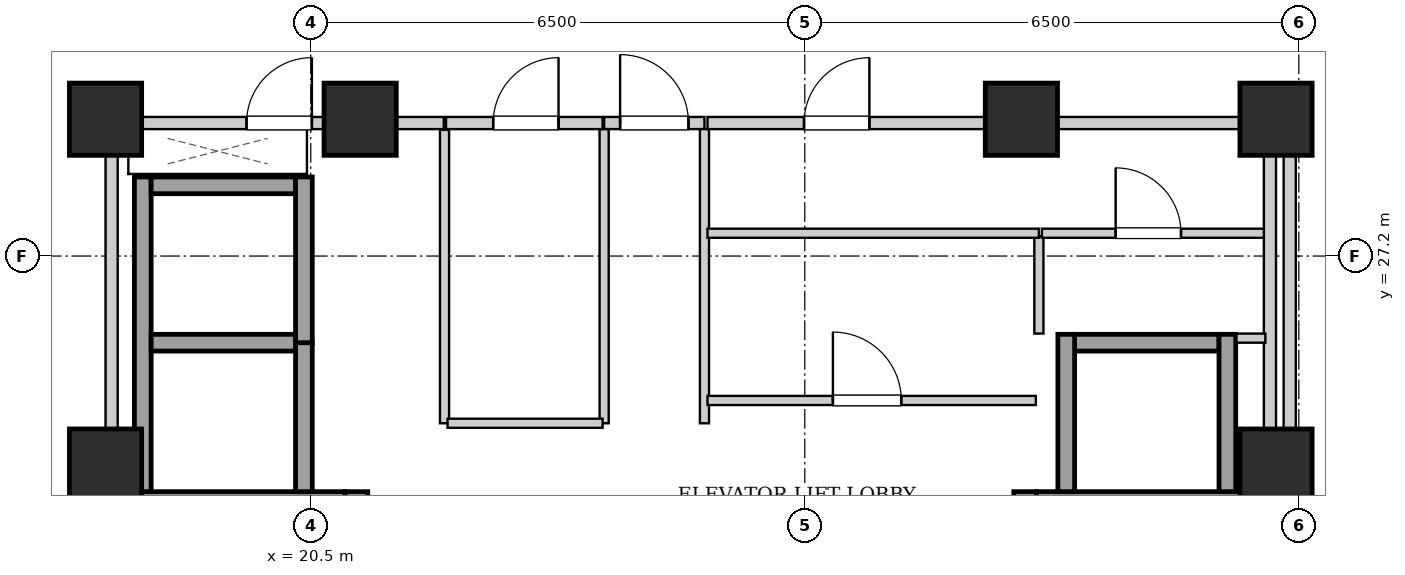
"""IFC4 building model, lengths in metres.
Left out: names, types, materials, properties, quantities, classifications, styles, units other than length and angle.
Written with IfcOpenShell. Run it as: python <this file> out.ifc"""

import sys

from ifc_helpers import new_model, si_unit, direction, frame, frame_2d, origin, origin_2d, place, context, subcontext, project, spatial, rectangle, extrude, element, fill, save


model = new_model("IFC4")
c1 = context("Model", 3, precision=1e-05, world=origin(), true_north=direction((0.0, 1.0)))
c2 = subcontext(c1, "Body", "Model", "MODEL_VIEW")
j1 = project(units=[si_unit("LENGTHUNIT", "METRE"), si_unit("PLANEANGLEUNIT", "RADIAN")], contexts=[c1])
p1 = place(None, origin())
s1 = spatial("IfcSite", under=j1, at=p1, CompositionType="ELEMENT")
p2 = place(p1, origin())
s2 = spatial("IfcBuilding", under=s1, at=p2, CompositionType="ELEMENT")
p3 = place(p2, frame((0.0, 0.0, 160.15)))
s3 = spatial("IfcBuildingStorey", under=s2, at=p3, CompositionType="ELEMENT", Elevation=160.15)
for number, where, z_axis, x_axis in (
    (1, (17.8, 29.0, 0.0), (0.0, 0.0, 1.0), (1.0, 0.0, 0.0)),
    (2, (21.15, 29.0, 0.0), (0.0, 0.0, 1.0), (1.0, 0.0, 0.0)),
    (3, (29.85, 29.0, 0.0), (0.0, 0.0, 1.0), (1.0, 0.0, 0.0)),
    (4, (33.2, 29.0, 0.0), (0.0, 0.0, 1.0), (1.0, 0.0, 0.0)),
    (5, (17.8, 24.45, 0.0), (0.0, 0.0, 1.0), (1.0, 0.0, 0.0)),
    (6, (33.2, 24.45, 0.0), (0.0, 0.0, 1.0), (1.0, 0.0, 0.0)),
):
    element("IfcColumn", number, at=place(p3, frame(where, z_axis=z_axis, x_axis=x_axis)), inside=s3, PredefinedType="COLUMN", context=c2, shape_type="SweptSolid", body=[
        extrude(rectangle(XDim=0.95, YDim=0.95, at=origin_2d()), origin(), (0.0, 0.0, 1.0), 3.25),
    ])
for number, where, z_axis, x_axis in (
    (7, (17.95, 15.1, 0.0), (0.0, 0.0, 1.0), (0.0, 1.0, 0.0)),
    (8, (21.1, 15.1, 0.0), (0.0, 0.0, 1.0), (0.0, 1.0, 0.0)),
):
    element("IfcWall", number, at=place(p3, frame(where, z_axis=z_axis, x_axis=x_axis)), inside=s3, PredefinedType="SHEAR", context=c2, shape_type="SweptSolid", body=[
        extrude(rectangle(XDim=9.0, YDim=0.3, at=frame_2d((4.5, 0.0))), origin(), (0.0, 0.0, 1.0), 2.99),
    ])
p4 = place(p3, frame((18.1, 23.95, 0.0), z_axis=(0.0, 0.0, 1.0), x_axis=(1.0, 0.0, 0.0)))
e9 = element("IfcWall", 9, at=p4, inside=s3, PredefinedType="SHEAR", context=c2, shape_type="SweptSolid", body=[
    extrude(rectangle(XDim=2.85, YDim=0.3, at=frame_2d((1.425, 0.0))), origin(), (0.0, 0.0, 1.0), 2.99),
])
for number, where, z_axis, x_axis in (
    (10, (29.9, 15.1, 0.0), (0.0, 0.0, 1.0), (0.0, 1.0, 0.0)),
    (11, (33.05, 15.1, 0.0), (0.0, 0.0, 1.0), (0.0, 1.0, 0.0)),
):
    element("IfcWall", number, at=place(p3, frame(where, z_axis=z_axis, x_axis=x_axis)), inside=s3, PredefinedType="SHEAR", context=c2, shape_type="SweptSolid", body=[
        extrude(rectangle(XDim=9.0, YDim=0.3, at=frame_2d((4.5, 0.0))), origin(), (0.0, 0.0, 1.0), 2.99),
    ])
p5 = place(p3, frame((30.05, 23.95, 0.0), z_axis=(0.0, 0.0, 1.0), x_axis=(1.0, 0.0, 0.0)))
e12 = element("IfcWall", 12, at=p5, inside=s3, PredefinedType="SHEAR", context=c2, shape_type="SweptSolid", body=[
    extrude(rectangle(XDim=2.85, YDim=0.3, at=frame_2d((1.425, 0.0))), origin(), (0.0, 0.0, 1.0), 2.99),
])
p6 = place(p3, frame((18.29, 24.1, 0.0), z_axis=(0.0, 0.0, 1.0), x_axis=(0.0, 1.0, 0.0)))
e13 = element("IfcWall", 13, at=p6, inside=s3, PredefinedType="SHEAR", context=c2, shape_type="SweptSolid", body=[
    extrude(rectangle(XDim=4.14, YDim=0.22, at=frame_2d((2.07, 0.0))), origin(), (0.0, 0.0, 1.0), 2.99),
])
p7 = place(p3, frame((20.41, 24.1, 0.0), z_axis=(0.0, 0.0, 1.0), x_axis=(0.0, 1.0, 0.0)))
e14 = element("IfcWall", 14, at=p7, inside=s3, PredefinedType="SHEAR", context=c2, shape_type="SweptSolid", body=[
    extrude(rectangle(XDim=1.96, YDim=0.22, at=frame_2d((0.98, 0.0))), origin(), (0.0, 0.0, 1.0), 2.99),
])
for number, where, z_axis, x_axis in (
    (15, (18.4, 26.06, 0.0), (0.0, 0.0, 1.0), (1.0, 0.0, 0.0)),
    (16, (18.4, 28.13, 0.0), (0.0, 0.0, 1.0), (1.0, 0.0, 0.0)),
):
    element("IfcWall", number, at=place(p3, frame(where, z_axis=z_axis, x_axis=x_axis)), inside=s3, PredefinedType="SHEAR", context=c2, shape_type="SweptSolid", body=[
        extrude(rectangle(XDim=1.9, YDim=0.22, at=frame_2d((0.95, 0.0))), origin(), (0.0, 0.0, 1.0), 2.99),
    ])
p8 = place(p3, frame((20.41, 26.06, 0.0), z_axis=(0.0, 0.0, 1.0), x_axis=(0.0, 1.0, 0.0)))
e17 = element("IfcWall", 17, at=p8, inside=s3, PredefinedType="SHEAR", context=c2, shape_type="SweptSolid", body=[
    extrude(rectangle(XDim=2.18, YDim=0.22, at=frame_2d((1.09, 0.0))), origin(), (0.0, 0.0, 1.0), 2.99),
])
p9 = place(p3, frame((30.55, 26.06, 0.0), z_axis=(0.0, 0.0, 1.0), x_axis=(1.0, 0.0, 0.0)))
e18 = element("IfcWall", 18, at=p9, inside=s3, PredefinedType="SHEAR", context=c2, shape_type="SweptSolid", body=[
    extrude(rectangle(XDim=1.9, YDim=0.22, at=frame_2d((0.95, 0.0))), origin(), (0.0, 0.0, 1.0), 2.99),
])
for number, where, z_axis, x_axis in (
    (19, (30.44, 24.1, 0.0), (0.0, 0.0, 1.0), (0.0, 1.0, 0.0)),
    (20, (32.56, 24.1, 0.0), (0.0, 0.0, 1.0), (0.0, 1.0, 0.0)),
):
    element("IfcWall", number, at=place(p3, frame(where, z_axis=z_axis, x_axis=x_axis)), inside=s3, PredefinedType="SHEAR", context=c2, shape_type="SweptSolid", body=[
        extrude(rectangle(XDim=2.07, YDim=0.22, at=frame_2d((1.035, 0.0))), origin(), (0.0, 0.0, 1.0), 2.99),
    ])
for number, where, z_axis, x_axis in (
    (21, (17.88, 24.12, 0.0), (0.0, 0.0, 1.0), (0.0, 1.0, 0.0)),
    (22, (33.12, 24.12, 0.0), (0.0, 0.0, 1.0), (0.0, 1.0, 0.0)),
):
    element("IfcWall", number, at=place(p3, frame(where, z_axis=z_axis, x_axis=x_axis)), inside=s3, PredefinedType="PARTITIONING", context=c2, shape_type="SweptSolid", body=[
        extrude(rectangle(XDim=4.76, YDim=0.16, at=frame_2d((2.38, 0.0))), origin(), (0.0, 0.0, 1.0), 2.99),
    ])
p10 = place(p3, frame((24.36, 28.95, 0.0), z_axis=(0.0, 0.0, 1.0), x_axis=(1.0, 0.0, 0.0)))
e23 = element("IfcWall", 23, at=p10, inside=s3, PredefinedType="PARTITIONING", context=c2, shape_type="SweptSolid", body=[
    extrude(rectangle(XDim=1.32, YDim=0.16, at=frame_2d((0.66, 0.0))), origin(), (0.0, 0.0, 1.0), 2.442),
])
p11 = place(p10, frame((0.21, 0.0, 0.0)))
e24 = element("IfcOpeningElement", 24, at=p11, cuts=e23, PredefinedType="OPENING", context=c2, shape_type="SweptSolid", body=[
    extrude(rectangle(XDim=0.9, YDim=2.05, at=frame_2d((0.45, 1.025))), frame((0.0, 0.09, 0.0), z_axis=(0.0, -1.0, 0.0), x_axis=(1.0, 0.0, 0.0)), (0.0, 0.0, 1.0), 0.18),
])
p12 = place(p3, frame((17.96, 28.95, 0.0), z_axis=(0.0, 0.0, 1.0), x_axis=(1.0, 0.0, 0.0)))
e25 = element("IfcWall", 25, at=p12, inside=s3, PredefinedType="PARTITIONING", context=c2, shape_type="SweptSolid", body=[
    extrude(rectangle(XDim=4.29, YDim=0.16, at=frame_2d((2.145, 0.0))), origin(), (0.0, 0.0, 1.0), 2.442),
])
p13 = place(p12, frame((1.695, 0.0, 0.0)))
e26 = element("IfcOpeningElement", 26, at=p13, cuts=e25, PredefinedType="OPENING", context=c2, shape_type="SweptSolid", body=[
    extrude(rectangle(XDim=0.86, YDim=2.05, at=frame_2d((0.43, 1.025))), frame((0.0, 0.09, 0.0), z_axis=(0.0, -1.0, 0.0), x_axis=(1.0, 0.0, 0.0)), (0.0, 0.0, 1.0), 0.18),
])
for number, where, z_axis, x_axis in (
    (27, (24.36, 25.0, 0.0), (0.0, 0.0, 1.0), (0.0, 1.0, 0.0)),
    (28, (25.68, 25.0, 0.0), (0.0, 0.0, 1.0), (0.0, 1.0, 0.0)),
):
    element("IfcWall", number, at=place(p3, frame(where, z_axis=z_axis, x_axis=x_axis)), inside=s3, PredefinedType="PARTITIONING", context=c2, shape_type="SweptSolid", body=[
        extrude(rectangle(XDim=3.87, YDim=0.12, at=frame_2d((1.935, 0.0))), origin(), (0.0, 0.0, 1.0), 2.99),
    ])
p14 = place(p3, frame((30.08, 26.18, 0.0), z_axis=(0.0, 0.0, 1.0), x_axis=(0.0, 1.0, 0.0)))
e29 = element("IfcWall", 29, at=p14, inside=s3, PredefinedType="PARTITIONING", context=c2, shape_type="SweptSolid", body=[
    extrude(rectangle(XDim=1.28, YDim=0.12, at=frame_2d((0.64, 0.0))), origin(), (0.0, 0.0, 1.0), 2.99),
])
p15 = place(p3, frame((32.68, 26.12, 0.0), z_axis=(0.0, 0.0, 1.0), x_axis=(1.0, 0.0, 0.0)))
e30 = element("IfcWall", 30, at=p15, inside=s3, PredefinedType="PARTITIONING", context=c2, shape_type="SweptSolid", body=[
    extrude(rectangle(XDim=0.38, YDim=0.12, at=frame_2d((0.19, 0.0))), origin(), (0.0, 0.0, 1.0), 2.99),
])
p16 = place(p3, frame((30.12, 27.5, 0.0), z_axis=(0.0, 0.0, 1.0), x_axis=(1.0, 0.0, 0.0)))
e31 = element("IfcWall", 31, at=p16, inside=s3, PredefinedType="PARTITIONING", context=c2, shape_type="SweptSolid", body=[
    extrude(rectangle(XDim=2.92, YDim=0.12, at=frame_2d((1.46, 0.0))), origin(), (0.0, 0.0, 1.0), 2.99),
])
p17 = place(p16, frame((0.97, 0.0, 0.0)))
e32 = element("IfcOpeningElement", 32, at=p17, cuts=e31, PredefinedType="OPENING", context=c2, shape_type="SweptSolid", body=[
    extrude(rectangle(XDim=0.86, YDim=2.05, at=frame_2d((0.43, 1.025))), frame((0.0, 0.07, 0.0), z_axis=(0.0, -1.0, 0.0), x_axis=(1.0, 0.0, 0.0)), (0.0, 0.0, 1.0), 0.14),
])
p18 = place(p3, frame((22.26, 25.0, 0.0), z_axis=(0.0, 0.0, 1.0), x_axis=(0.0, 1.0, 0.0)))
e33 = element("IfcWall", 33, at=p18, inside=s3, PredefinedType="PARTITIONING", context=c2, shape_type="SweptSolid", body=[
    extrude(rectangle(XDim=3.86, YDim=0.12, at=frame_2d((1.93, 0.0))), origin(), (0.0, 0.0, 1.0), 2.99),
])
p19 = place(p3, frame((22.3, 25.0, 0.0), z_axis=(0.0, 0.0, 1.0), x_axis=(1.0, 0.0, 0.0)))
e34 = element("IfcWall", 34, at=p19, inside=s3, PredefinedType="PARTITIONING", context=c2, shape_type="SweptSolid", body=[
    extrude(rectangle(XDim=2.04, YDim=0.12, at=frame_2d((1.02, 0.0))), origin(), (0.0, 0.0, 1.0), 2.99),
])
p20 = place(p3, frame((22.28, 28.95, 0.0), z_axis=(0.0, 0.0, 1.0), x_axis=(1.0, 0.0, 0.0)))
e35 = element("IfcWall", 35, at=p20, inside=s3, PredefinedType="PARTITIONING", context=c2, shape_type="SweptSolid", body=[
    extrude(rectangle(XDim=2.06, YDim=0.16, at=frame_2d((1.03, 0.0))), origin(), (0.0, 0.0, 1.0), 2.442),
])
p21 = place(p20, frame((0.62, 0.0, 0.0)))
e36 = element("IfcOpeningElement", 36, at=p21, cuts=e35, PredefinedType="OPENING", context=c2, shape_type="SweptSolid", body=[
    extrude(rectangle(XDim=0.86, YDim=2.05, at=frame_2d((0.43, 1.025))), frame((0.0, 0.09, 0.0), z_axis=(0.0, -1.0, 0.0), x_axis=(1.0, 0.0, 0.0)), (0.0, 0.0, 1.0), 0.18),
])
p22 = place(p3, frame((25.72, 27.5, 0.0), z_axis=(0.0, 0.0, 1.0), x_axis=(1.0, 0.0, 0.0)))
e37 = element("IfcWall", 37, at=p22, inside=s3, PredefinedType="PARTITIONING", context=c2, shape_type="SweptSolid", body=[
    extrude(rectangle(XDim=4.36, YDim=0.12, at=frame_2d((2.18, 0.0))), origin(), (0.0, 0.0, 1.0), 2.99),
])
p23 = place(p3, frame((25.72, 25.3, 0.0), z_axis=(0.0, 0.0, 1.0), x_axis=(1.0, 0.0, 0.0)))
e38 = element("IfcWall", 38, at=p23, inside=s3, PredefinedType="PARTITIONING", context=c2, shape_type="SweptSolid", body=[
    extrude(rectangle(XDim=4.32, YDim=0.12, at=frame_2d((2.16, 0.0))), origin(), (0.0, 0.0, 1.0), 2.99),
])
p24 = place(p23, frame((1.65, 0.0, 0.0)))
e39 = element("IfcOpeningElement", 39, at=p24, cuts=e38, PredefinedType="OPENING", context=c2, shape_type="SweptSolid", body=[
    extrude(rectangle(XDim=0.9, YDim=2.05, at=frame_2d((0.45, 1.025))), frame((0.0, 0.07, 0.0), z_axis=(0.0, -1.0, 0.0), x_axis=(1.0, 0.0, 0.0)), (0.0, 0.0, 1.0), 0.14),
])
p25 = place(p3, frame((25.72, 28.95, 0.0), z_axis=(0.0, 0.0, 1.0), x_axis=(1.0, 0.0, 0.0)))
e40 = element("IfcWall", 40, at=p25, inside=s3, PredefinedType="PARTITIONING", context=c2, shape_type="SweptSolid", body=[
    extrude(rectangle(XDim=7.32, YDim=0.16, at=frame_2d((3.66, 0.0))), origin(), (0.0, 0.0, 1.0), 2.442),
])
p26 = place(p25, frame((1.27, 0.0, 0.0)))
e41 = element("IfcOpeningElement", 41, at=p26, cuts=e40, PredefinedType="OPENING", context=c2, shape_type="SweptSolid", body=[
    extrude(rectangle(XDim=0.86, YDim=2.05, at=frame_2d((0.43, 1.025))), frame((0.0, 0.09, 0.0), z_axis=(0.0, -1.0, 0.0), x_axis=(1.0, 0.0, 0.0)), (0.0, 0.0, 1.0), 0.18),
])
p27 = place(p3, frame((33.38, 15.02, 0.0), z_axis=(0.0, 0.0, 1.0), x_axis=(0.0, 1.0, 0.0)))
e42 = element("IfcWall", 42, at=p27, inside=s3, PredefinedType="PARTITIONING", context=c2, shape_type="SweptSolid", body=[
    extrude(rectangle(XDim=13.98, YDim=0.16, at=frame_2d((6.99, 0.0))), origin(), (0.0, 0.0, 1.0), 2.99),
])
p28 = place(p11, origin())
e43 = element("IfcDoor", 43, at=p28, inside=s3, OperationType="SINGLE_SWING_LEFT", PredefinedType="DOOR", context=c2, shape_type="SweptSolid", body=[
    extrude(rectangle(XDim=0.9, YDim=2.05, at=frame_2d((0.45, 1.025))), frame((0.0, 0.025, 0.0), z_axis=(0.0, -1.0, 0.0), x_axis=(1.0, 0.0, 0.0)), (0.0, 0.0, 1.0), 0.05),
])
fill(e24, e43)
p29 = place(p13, origin())
e44 = element("IfcDoor", 44, at=p29, inside=s3, OperationType="SINGLE_SWING_RIGHT", PredefinedType="DOOR", context=c2, shape_type="SweptSolid", body=[
    extrude(rectangle(XDim=0.86, YDim=2.05, at=frame_2d((0.43, 1.025))), frame((0.0, 0.025, 0.0), z_axis=(0.0, -1.0, 0.0), x_axis=(1.0, 0.0, 0.0)), (0.0, 0.0, 1.0), 0.05),
])
fill(e26, e44)
p30 = place(p17, origin())
e45 = element("IfcDoor", 45, at=p30, inside=s3, OperationType="SINGLE_SWING_LEFT", PredefinedType="DOOR", context=c2, shape_type="SweptSolid", body=[
    extrude(rectangle(XDim=0.86, YDim=2.05, at=frame_2d((0.43, 1.025))), frame((0.0, 0.025, 0.0), z_axis=(0.0, -1.0, 0.0), x_axis=(1.0, 0.0, 0.0)), (0.0, 0.0, 1.0), 0.05),
])
fill(e32, e45)
p31 = place(p21, origin())
e46 = element("IfcDoor", 46, at=p31, inside=s3, OperationType="SINGLE_SWING_RIGHT", PredefinedType="DOOR", context=c2, shape_type="SweptSolid", body=[
    extrude(rectangle(XDim=0.86, YDim=2.05, at=frame_2d((0.43, 1.025))), frame((0.0, 0.025, 0.0), z_axis=(0.0, -1.0, 0.0), x_axis=(1.0, 0.0, 0.0)), (0.0, 0.0, 1.0), 0.05),
])
fill(e36, e46)
p32 = place(p24, origin())
e47 = element("IfcDoor", 47, at=p32, inside=s3, OperationType="SINGLE_SWING_LEFT", PredefinedType="DOOR", context=c2, shape_type="SweptSolid", body=[
    extrude(rectangle(XDim=0.9, YDim=2.05, at=frame_2d((0.45, 1.025))), frame((0.0, 0.025, 0.0), z_axis=(0.0, -1.0, 0.0), x_axis=(1.0, 0.0, 0.0)), (0.0, 0.0, 1.0), 0.05),
])
fill(e39, e47)
p33 = place(p26, origin())
e48 = element("IfcDoor", 48, at=p33, inside=s3, OperationType="SINGLE_SWING_RIGHT", PredefinedType="DOOR", context=c2, shape_type="SweptSolid", body=[
    extrude(rectangle(XDim=0.86, YDim=2.05, at=frame_2d((0.43, 1.025))), frame((0.0, 0.025, 0.0), z_axis=(0.0, -1.0, 0.0), x_axis=(1.0, 0.0, 0.0)), (0.0, 0.0, 1.0), 0.05),
])
fill(e41, e48)
save(model, sys.argv[1])
